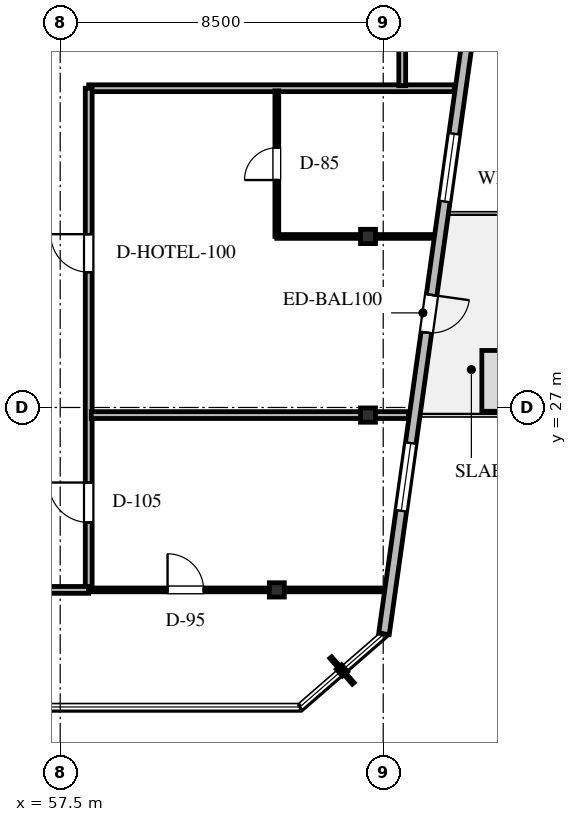
"""IFC4 building model, lengths in metres.
Left out: names, types, materials, properties, quantities, classifications, styles, units other than length and angle.
Written with IfcOpenShell. Run it as: python <this file> out.ifc"""

import sys

from ifc_helpers import new_model, si_unit, direction, frame, frame_2d, origin, origin_2d, place, context, subcontext, project, spatial, rectangle, i_section, extrude, element, fill, save


model = new_model("IFC4")
c1 = context("Model", 3, precision=1e-05, world=origin(), true_north=direction((0.0, 1.0)))
c2 = subcontext(c1, "Body", "Model", "MODEL_VIEW")
j1 = project(units=[si_unit("LENGTHUNIT", "METRE"), si_unit("PLANEANGLEUNIT", "RADIAN")], contexts=[c1])
p1 = place(None, origin())
s1 = spatial("IfcSite", under=j1, at=p1, CompositionType="ELEMENT")
p2 = place(p1, origin())
s2 = spatial("IfcBuilding", under=s1, at=p2, CompositionType="ELEMENT")
p3 = place(p2, frame((0.0, 0.0, 282.3)))
s3 = spatial("IfcBuildingStorey", under=s2, at=p3, CompositionType="ELEMENT", Elevation=282.3)
for number, where, z_axis, x_axis in (
    (1, (65.6, 31.5, 0.0), (0.0, 0.0, 1.0), (1.0, 0.0, 0.0)),
    (2, (65.6, 26.8, 0.0), (0.0, 0.0, 1.0), (1.0, 0.0, 0.0)),
    (3, (63.2, 22.2, 0.0), (0.0, 0.0, 1.0), (1.0, 0.0, 0.0)),
):
    element("IfcColumn", number, at=place(p3, frame(where, z_axis=z_axis, x_axis=x_axis)), inside=s3, PredefinedType="COLUMN", context=c2, shape_type="SweptSolid", body=[
        extrude(i_section(OverallWidth=0.394, OverallDepth=0.376, WebThickness=0.017, FlangeThickness=0.028, FilletRadius=0.03, at=origin_2d()), origin(), (0.0, 0.0, 1.0), 3.6),
    ])
p4 = place(p3, frame((68.375, 37.8, 0.0), z_axis=(0.0, 0.0, 1.0), x_axis=(-0.139171056495, -0.99026835607, 0.0)))
e4 = element("IfcWall", 4, at=p4, inside=s3, PredefinedType="STANDARD", context=c2, shape_type="SweptSolid", body=[
    extrude(rectangle(XDim=16.923, YDim=0.28, at=frame_2d((8.462, 0.0))), origin(), (0.0, 0.0, 1.0), 3.365),
])
p5 = place(p4, frame((7.915, 0.0, 0.0)))
e5 = element("IfcOpeningElement", 5, at=p5, cuts=e4, PredefinedType="OPENING", context=c2, shape_type="SweptSolid", body=[
    extrude(rectangle(XDim=1.0, YDim=2.15, at=frame_2d((0.5, 1.075))), frame((0.0, 0.15, 0.0), z_axis=(0.0, -1.0, 0.0), x_axis=(1.0, 0.0, 0.0)), (0.0, 0.0, 1.0), 0.3),
])
p6 = place(p4, frame((3.634, 0.0, 0.65)))
e6 = element("IfcOpeningElement", 6, at=p6, cuts=e4, PredefinedType="OPENING", context=c2, shape_type="SweptSolid", body=[
    extrude(rectangle(XDim=1.8, YDim=2.1, at=frame_2d((0.9, 1.05))), frame((0.0, 0.15, 0.0), z_axis=(0.0, -1.0, 0.0), x_axis=(1.0, 0.0, 0.0)), (0.0, 0.0, 1.0), 0.3),
])
p7 = place(p4, frame((11.852, 0.0, 0.65)))
e7 = element("IfcOpeningElement", 7, at=p7, cuts=e4, PredefinedType="OPENING", context=c2, shape_type="SweptSolid", body=[
    extrude(rectangle(XDim=1.8, YDim=2.1, at=frame_2d((0.9, 1.05))), frame((0.0, 0.15, 0.0), z_axis=(0.0, -1.0, 0.0), x_axis=(1.0, 0.0, 0.0)), (0.0, 0.0, 1.0), 0.3),
])
p8 = place(p3, frame((58.25, 35.4, 0.0), z_axis=(0.0, 0.0, 1.0), x_axis=(1.0, 0.0, 0.0)))
e8 = element("IfcWall", 8, at=p8, inside=s3, PredefinedType="STANDARD", context=c2, shape_type="SweptSolid", body=[
    extrude(rectangle(XDim=9.621, YDim=0.18, at=frame_2d((4.811, 0.0))), origin(), (0.0, 0.0, 1.0), 3.365),
])
p9 = place(p3, frame((66.5, 35.468, 0.0), z_axis=(0.0, 0.0, 1.0), x_axis=(0.0, 1.0, 0.0)))
e9 = element("IfcWall", 9, at=p9, inside=s3, PredefinedType="STANDARD", context=c2, shape_type="SweptSolid", body=[
    extrude(rectangle(XDim=2.582, YDim=0.18, at=frame_2d((1.291, 0.0))), origin(), (0.0, 0.0, 1.0), 2.754),
])
p10 = place(p3, frame((58.25, 22.2, 0.0), z_axis=(0.0, 0.0, 1.0), x_axis=(0.0, 1.0, 0.0)))
e10 = element("IfcWall", 10, at=p10, inside=s3, PredefinedType="STANDARD", context=c2, shape_type="SweptSolid", body=[
    extrude(rectangle(XDim=13.2, YDim=0.18, at=frame_2d((6.6, 0.0))), origin(), (0.0, 0.0, 1.0), 2.754),
])
p11 = place(p10, frame((1.775, 0.0, 0.0)))
e11 = element("IfcOpeningElement", 11, at=p11, cuts=e10, PredefinedType="OPENING", context=c2, shape_type="SweptSolid", body=[
    extrude(rectangle(XDim=1.05, YDim=2.2, at=frame_2d((0.525, 1.1))), frame((0.0, 0.1, 0.0), z_axis=(0.0, -1.0, 0.0), x_axis=(1.0, 0.0, 0.0)), (0.0, 0.0, 1.0), 0.2),
])
p12 = place(p10, frame((8.36, 0.0, 0.0)))
e12 = element("IfcOpeningElement", 12, at=p12, cuts=e10, PredefinedType="OPENING", context=c2, shape_type="SweptSolid", body=[
    extrude(rectangle(XDim=1.0, YDim=2.15, at=frame_2d((0.5, 1.075))), frame((0.0, 0.1, 0.0), z_axis=(0.0, -1.0, 0.0), x_axis=(1.0, 0.0, 0.0)), (0.0, 0.0, 1.0), 0.2),
])
p13 = place(p3, frame((56.0, 22.2, 0.0), z_axis=(0.0, 0.0, 1.0), x_axis=(1.0, 0.0, 0.0)))
e13 = element("IfcWall", 13, at=p13, inside=s3, PredefinedType="STANDARD", context=c2, shape_type="SweptSolid", body=[
    extrude(rectangle(XDim=2.25, YDim=0.18, at=frame_2d((1.125, 0.0))), origin(), (0.0, 0.0, 1.0), 2.754),
])
p14 = place(p3, frame((58.318, 26.8, 0.0), z_axis=(0.0, 0.0, 1.0), x_axis=(1.0, 0.0, 0.0)))
e14 = element("IfcWall", 14, at=p14, inside=s3, PredefinedType="STANDARD", context=c2, shape_type="SweptSolid", body=[
    extrude(rectangle(XDim=8.344, YDim=0.18, at=frame_2d((4.172, 0.0))), origin(), (0.0, 0.0, 1.0), 2.754),
])
p15 = place(p3, frame((58.25, 22.2, 0.0), z_axis=(0.0, 0.0, 1.0), x_axis=(1.0, 0.0, 0.0)))
e15 = element("IfcWall", 15, at=p15, inside=s3, PredefinedType="PARTITIONING", context=c2, shape_type="SweptSolid", body=[
    extrude(rectangle(XDim=7.766, YDim=0.1, at=frame_2d((3.883, 0.0))), origin(), (0.0, 0.0, 1.0), 2.754),
])
p16 = place(p15, frame((2.075, 0.0, 0.0)))
e16 = element("IfcOpeningElement", 16, at=p16, cuts=e15, PredefinedType="OPENING", context=c2, shape_type="SweptSolid", body=[
    extrude(rectangle(XDim=0.95, YDim=2.15, at=frame_2d((0.475, 1.075))), frame((0.0, 0.06, 0.0), z_axis=(0.0, -1.0, 0.0), x_axis=(1.0, 0.0, 0.0)), (0.0, 0.0, 1.0), 0.12),
])
p17 = place(p3, frame((63.2, 31.5, 0.0), z_axis=(0.0, 0.0, 1.0), x_axis=(1.0, 0.0, 0.0)))
e17 = element("IfcWall", 17, at=p17, inside=s3, PredefinedType="PARTITIONING", context=c2, shape_type="SweptSolid", body=[
    extrude(rectangle(XDim=4.123, YDim=0.1, at=frame_2d((2.062, 0.0))), origin(), (0.0, 0.0, 1.0), 2.754),
])
p18 = place(p3, frame((63.2, 31.5, 0.0), z_axis=(0.0, 0.0, 1.0), x_axis=(0.0, 1.0, 0.0)))
e18 = element("IfcWall", 18, at=p18, inside=s3, PredefinedType="PARTITIONING", context=c2, shape_type="SweptSolid", body=[
    extrude(rectangle(XDim=3.832, YDim=0.1, at=frame_2d((1.916, 0.0))), origin(), (0.0, 0.0, 1.0), 2.754),
])
p19 = place(p18, frame((1.485, 0.0, 0.0)))
e19 = element("IfcOpeningElement", 19, at=p19, cuts=e18, PredefinedType="OPENING", context=c2, shape_type="SweptSolid", body=[
    extrude(rectangle(XDim=0.85, YDim=2.1, at=frame_2d((0.425, 1.05))), frame((0.0, 0.06, 0.0), z_axis=(0.0, -1.0, 0.0), x_axis=(1.0, 0.0, 0.0)), (0.0, 0.0, 1.0), 0.12),
])
p20 = place(p5, origin())
e20 = element("IfcDoor", 20, at=p20, inside=s3, OperationType="SINGLE_SWING_LEFT", PredefinedType="DOOR", context=c2, shape_type="SweptSolid", body=[
    extrude(rectangle(XDim=1.0, YDim=2.15, at=frame_2d((0.5, 1.075))), frame((0.0, 0.025, 0.0), z_axis=(0.0, -1.0, 0.0), x_axis=(1.0, 0.0, 0.0)), (0.0, 0.0, 1.0), 0.05),
])
fill(e5, e20)
p21 = place(p6, origin())
e21 = element("IfcWindow", 21, at=p21, inside=s3, PartitioningType="SINGLE_PANEL", PredefinedType="WINDOW", context=c2, shape_type="SweptSolid", body=[
    extrude(rectangle(XDim=1.8, YDim=2.1, at=frame_2d((0.9, 1.05))), frame((0.0, 0.03, 0.0), z_axis=(0.0, -1.0, 0.0), x_axis=(1.0, 0.0, 0.0)), (0.0, 0.0, 1.0), 0.06),
])
fill(e6, e21)
p22 = place(p7, origin())
e22 = element("IfcWindow", 22, at=p22, inside=s3, PartitioningType="SINGLE_PANEL", PredefinedType="WINDOW", context=c2, shape_type="SweptSolid", body=[
    extrude(rectangle(XDim=1.8, YDim=2.1, at=frame_2d((0.9, 1.05))), frame((0.0, 0.03, 0.0), z_axis=(0.0, -1.0, 0.0), x_axis=(1.0, 0.0, 0.0)), (0.0, 0.0, 1.0), 0.06),
])
fill(e7, e22)
p23 = place(p11, origin())
e23 = element("IfcDoor", 23, at=p23, inside=s3, OperationType="SINGLE_SWING_RIGHT", PredefinedType="DOOR", context=c2, shape_type="SweptSolid", body=[
    extrude(rectangle(XDim=1.05, YDim=2.2, at=frame_2d((0.525, 1.1))), frame((0.0, 0.025, 0.0), z_axis=(0.0, -1.0, 0.0), x_axis=(1.0, 0.0, 0.0)), (0.0, 0.0, 1.0), 0.05),
])
fill(e11, e23)
p24 = place(p16, origin())
e24 = element("IfcDoor", 24, at=p24, inside=s3, OperationType="SINGLE_SWING_LEFT", PredefinedType="DOOR", context=c2, shape_type="SweptSolid", body=[
    extrude(rectangle(XDim=0.95, YDim=2.15, at=frame_2d((0.475, 1.075))), frame((0.0, 0.025, 0.0), z_axis=(0.0, -1.0, 0.0), x_axis=(1.0, 0.0, 0.0)), (0.0, 0.0, 1.0), 0.05),
])
fill(e16, e24)
p25 = place(p12, origin())
e25 = element("IfcDoor", 25, at=p25, inside=s3, OperationType="SINGLE_SWING_RIGHT", PredefinedType="DOOR", context=c2, shape_type="SweptSolid", body=[
    extrude(rectangle(XDim=1.0, YDim=2.15, at=frame_2d((0.5, 1.075))), frame((0.0, 0.025, 0.0), z_axis=(0.0, -1.0, 0.0), x_axis=(1.0, 0.0, 0.0)), (0.0, 0.0, 1.0), 0.05),
])
fill(e12, e25)
p26 = place(p19, origin())
e26 = element("IfcDoor", 26, at=p26, inside=s3, OperationType="SINGLE_SWING_LEFT", PredefinedType="DOOR", context=c2, shape_type="SweptSolid", body=[
    extrude(rectangle(XDim=0.85, YDim=2.1, at=frame_2d((0.425, 1.05))), frame((0.0, 0.025, 0.0), z_axis=(0.0, -1.0, 0.0), x_axis=(1.0, 0.0, 0.0)), (0.0, 0.0, 1.0), 0.05),
])
fill(e19, e26)
save(model, sys.argv[1])
